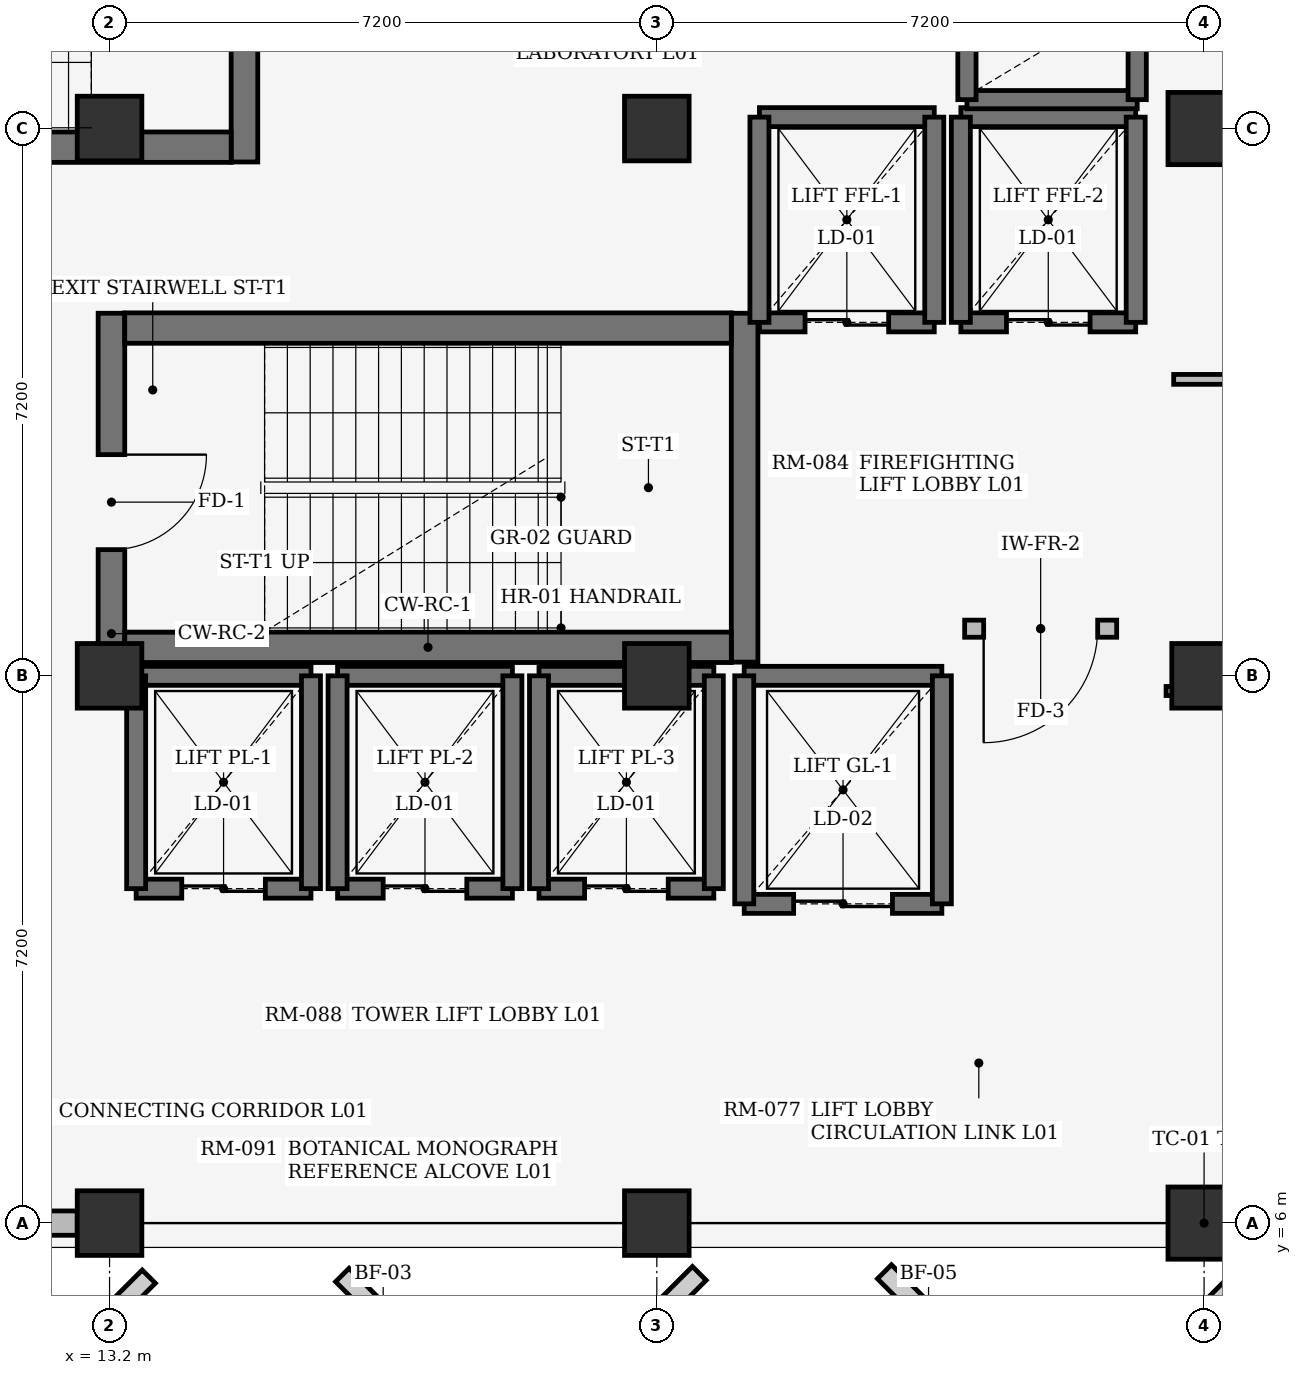
"""IFC4 building model, lengths in metres.
Left out: names, types, materials, properties, quantities, classifications, styles, units other than length and angle.
Written with IfcOpenShell. Run it as: python <this file> out.ifc"""

import sys

from ifc_helpers import new_model, si_unit, direction, frame, frame_2d, origin, origin_2d, place, context, subcontext, project, spatial, rectangle, extrude, element, fill, save


model = new_model("IFC4")
c1 = context("Model", 3, precision=1e-05, world=origin(), true_north=direction((0.0, 1.0)))
c2 = subcontext(c1, "Body", "Model", "MODEL_VIEW")
j1 = project(units=[si_unit("LENGTHUNIT", "METRE"), si_unit("PLANEANGLEUNIT", "RADIAN")], contexts=[c1])
p1 = place(None, origin())
s1 = spatial("IfcSite", under=j1, at=p1, CompositionType="ELEMENT")
p2 = place(p1, origin())
s2 = spatial("IfcBuilding", under=s1, at=p2, CompositionType="ELEMENT")
p3 = place(p2, frame((0.0, 0.0, 4.8)))
s3 = spatial("IfcBuildingStorey", under=s2, at=p3, CompositionType="ELEMENT", Elevation=4.8)
for number, where, z_axis, x_axis in (
    (1, (13.2, 6.0, 0.0), (0.0, 0.0, 1.0), (1.0, 0.0, 0.0)),
    (2, (13.2, 13.2, 0.0), (0.0, 0.0, 1.0), (1.0, 0.0, 0.0)),
    (3, (13.2, 20.4, 0.0), (0.0, 0.0, 1.0), (1.0, 0.0, 0.0)),
    (4, (20.4, 6.0, 0.0), (0.0, 0.0, 1.0), (1.0, 0.0, 0.0)),
    (5, (20.4, 13.2, 0.0), (0.0, 0.0, 1.0), (1.0, 0.0, 0.0)),
    (6, (20.4, 20.4, 0.0), (0.0, 0.0, 1.0), (1.0, 0.0, 0.0)),
):
    element("IfcColumn", number, at=place(p3, frame(where, z_axis=z_axis, x_axis=x_axis)), inside=s3, PredefinedType="COLUMN", context=c2, shape_type="SweptSolid", body=[
        extrude(rectangle(XDim=0.85, YDim=0.85, at=origin_2d()), origin(), (0.0, 0.0, 1.0), 3.95),
    ])
p4 = place(p3, frame((27.6, 6.0, 0.0), z_axis=(0.0, 0.0, 1.0), x_axis=(1.0, 0.0, 0.0)))
e7 = element("IfcColumn", 7, at=p4, inside=s3, PredefinedType="COLUMN", context=c2, shape_type="SweptSolid", body=[
    extrude(rectangle(XDim=0.95, YDim=0.95, at=origin_2d()), origin(), (0.0, 0.0, 1.0), 3.95),
])
p5 = place(p3, frame((27.6, 13.2, 0.0), z_axis=(0.0, 0.0, 1.0), x_axis=(1.0, 0.0, 0.0)))
e8 = element("IfcColumn", 8, at=p5, inside=s3, PredefinedType="COLUMN", context=c2, shape_type="SweptSolid", body=[
    extrude(rectangle(XDim=0.85, YDim=0.85, at=origin_2d()), origin(), (0.0, 0.0, 1.0), 3.95),
])
p6 = place(p3, frame((27.6, 20.4, 0.0), z_axis=(0.0, 0.0, 1.0), x_axis=(1.0, 0.0, 0.0)))
e9 = element("IfcColumn", 9, at=p6, inside=s3, PredefinedType="COLUMN", context=c2, shape_type="SweptSolid", body=[
    extrude(rectangle(XDim=0.95, YDim=0.95, at=origin_2d()), origin(), (0.0, 0.0, 1.0), 3.95),
])
p7 = place(p3, frame((6.425, 6.0, 0.0), z_axis=(0.0, 0.0, 1.0), x_axis=(1.0, 0.0, 0.0)))
e10 = element("IfcWall", 10, at=p7, inside=s3, PredefinedType="STANDARD", context=c2, shape_type="SweptSolid", body=[
    extrude(rectangle(XDim=6.35, YDim=0.32, at=frame_2d((3.175, 0.0))), origin(), (0.0, 0.0, 1.0), 3.33),
])
p8 = place(p7, frame((2.025, 0.0, 0.75)))
e11 = element("IfcOpeningElement", 11, at=p8, cuts=e10, PredefinedType="OPENING", context=c2, shape_type="SweptSolid", body=[
    extrude(rectangle(XDim=2.3, YDim=1.35, at=frame_2d((1.15, 0.675))), frame((0.0, 0.17, 0.0), z_axis=(0.0, -1.0, 0.0), x_axis=(1.0, 0.0, 0.0)), (0.0, 0.0, 1.0), 0.34),
])
p9 = place(p3, frame((13.225, 13.0, 0.0), z_axis=(0.0, 0.0, 1.0), x_axis=(0.0, 1.0, 0.0)))
e12 = element("IfcWall", 12, at=p9, inside=s3, PredefinedType="SHEAR", context=c2, shape_type="SweptSolid", body=[
    extrude(rectangle(XDim=4.97, YDim=0.35, at=frame_2d((2.485, 0.0))), origin(), (0.0, 0.0, 1.0), 3.95),
])
p10 = place(p9, frame((1.86, 0.0, 0.0)))
e13 = element("IfcOpeningElement", 13, at=p10, cuts=e12, PredefinedType="OPENING", context=c2, shape_type="SweptSolid", body=[
    extrude(rectangle(XDim=1.25, YDim=2.2, at=frame_2d((0.625, 1.1))), frame((0.0, 0.185, 0.0), z_axis=(0.0, -1.0, 0.0), x_axis=(1.0, 0.0, 0.0)), (0.0, 0.0, 1.0), 0.37),
])
p11 = place(p3, frame((21.555, 13.38, 0.0), z_axis=(0.0, 0.0, 1.0), x_axis=(0.0, 1.0, 0.0)))
e14 = element("IfcWall", 14, at=p11, inside=s3, PredefinedType="SHEAR", context=c2, shape_type="SweptSolid", body=[
    extrude(rectangle(XDim=4.59, YDim=0.35, at=frame_2d((2.295, 0.0))), origin(), (0.0, 0.0, 1.0), 3.95),
])
for number, where, z_axis, x_axis in (
    (15, (13.4, 13.575, 0.0), (0.0, 0.0, 1.0), (1.0, 0.0, 0.0)),
    (16, (13.4, 17.775, 0.0), (0.0, 0.0, 1.0), (1.0, 0.0, 0.0)),
):
    element("IfcWall", number, at=place(p3, frame(where, z_axis=z_axis, x_axis=x_axis)), inside=s3, PredefinedType="SHEAR", context=c2, shape_type="SweptSolid", body=[
        extrude(rectangle(XDim=7.98, YDim=0.4, at=frame_2d((3.99, 0.0))), origin(), (0.0, 0.0, 1.0), 3.95),
    ])
p12 = place(p3, frame((14.975, 24.55, 0.0), z_axis=(0.0, 0.0, 1.0), x_axis=(0.0, -1.0, 0.0)))
e17 = element("IfcWall", 17, at=p12, inside=s3, PredefinedType="SHEAR", context=c2, shape_type="SweptSolid", body=[
    extrude(rectangle(XDim=4.59, YDim=0.35, at=frame_2d((2.295, 0.0))), origin(), (0.0, 0.0, 1.0), 3.95),
])
p13 = place(p12, frame((1.72, 0.0, 0.0)))
e18 = element("IfcOpeningElement", 18, at=p13, cuts=e17, PredefinedType="OPENING", context=c2, shape_type="SweptSolid", body=[
    extrude(rectangle(XDim=1.15, YDim=2.2, at=frame_2d((0.575, 1.1))), frame((0.0, 0.185, 0.0), z_axis=(0.0, -1.0, 0.0), x_axis=(1.0, 0.0, 0.0)), (0.0, 0.0, 1.0), 0.37),
])
p14 = place(p3, frame((14.8, 20.155, 0.0), z_axis=(0.0, 0.0, 1.0), x_axis=(-1.0, 0.0, 0.0)))
e19 = element("IfcWall", 19, at=p14, inside=s3, PredefinedType="SHEAR", context=c2, shape_type="SweptSolid", body=[
    extrude(rectangle(XDim=7.98, YDim=0.4, at=frame_2d((3.99, 0.0))), origin(), (0.0, 0.0, 1.0), 3.95),
])
p15 = place(p3, frame((21.75, 17.85, 0.0), z_axis=(0.0, 0.0, 1.0), x_axis=(1.0, 0.0, 0.0)))
e20 = element("IfcWall", 20, at=p15, inside=s3, PredefinedType="SHEAR", context=c2, shape_type="SweptSolid", body=[
    extrude(rectangle(XDim=2.3, YDim=0.25, at=frame_2d((1.15, 0.0))), origin(), (0.0, 0.0, 1.0), 3.95),
])
p16 = place(p15, frame((0.6, 0.0, 0.0)))
e21 = element("IfcOpeningElement", 21, at=p16, cuts=e20, PredefinedType="OPENING", context=c2, shape_type="SweptSolid", body=[
    extrude(rectangle(XDim=1.1, YDim=2.2, at=frame_2d((0.55, 1.1))), frame((0.0, 0.135, 0.0), z_axis=(0.0, -1.0, 0.0), x_axis=(1.0, 0.0, 0.0)), (0.0, 0.0, 1.0), 0.27),
])
p17 = place(p3, frame((21.75, 20.55, 0.0), z_axis=(0.0, 0.0, 1.0), x_axis=(1.0, 0.0, 0.0)))
e22 = element("IfcWall", 22, at=p17, inside=s3, PredefinedType="SHEAR", context=c2, shape_type="SweptSolid", body=[
    extrude(rectangle(XDim=2.3, YDim=0.25, at=frame_2d((1.15, 0.0))), origin(), (0.0, 0.0, 1.0), 3.95),
])
for number, where, z_axis, x_axis in (
    (23, (21.75, 17.85, 0.0), (0.0, 0.0, 1.0), (0.0, 1.0, 0.0)),
    (24, (24.05, 17.85, 0.0), (0.0, 0.0, 1.0), (0.0, 1.0, 0.0)),
):
    element("IfcWall", number, at=place(p3, frame(where, z_axis=z_axis, x_axis=x_axis)), inside=s3, PredefinedType="SHEAR", context=c2, shape_type="SweptSolid", body=[
        extrude(rectangle(XDim=2.7, YDim=0.25, at=frame_2d((1.35, 0.0))), origin(), (0.0, 0.0, 1.0), 3.95),
    ])
p18 = place(p3, frame((24.4, 17.85, 0.0), z_axis=(0.0, 0.0, 1.0), x_axis=(1.0, 0.0, 0.0)))
e25 = element("IfcWall", 25, at=p18, inside=s3, PredefinedType="SHEAR", context=c2, shape_type="SweptSolid", body=[
    extrude(rectangle(XDim=2.3, YDim=0.25, at=frame_2d((1.15, 0.0))), origin(), (0.0, 0.0, 1.0), 3.95),
])
p19 = place(p18, frame((0.6, 0.0, 0.0)))
e26 = element("IfcOpeningElement", 26, at=p19, cuts=e25, PredefinedType="OPENING", context=c2, shape_type="SweptSolid", body=[
    extrude(rectangle(XDim=1.1, YDim=2.2, at=frame_2d((0.55, 1.1))), frame((0.0, 0.135, 0.0), z_axis=(0.0, -1.0, 0.0), x_axis=(1.0, 0.0, 0.0)), (0.0, 0.0, 1.0), 0.27),
])
p20 = place(p3, frame((24.4, 20.55, 0.0), z_axis=(0.0, 0.0, 1.0), x_axis=(1.0, 0.0, 0.0)))
e27 = element("IfcWall", 27, at=p20, inside=s3, PredefinedType="SHEAR", context=c2, shape_type="SweptSolid", body=[
    extrude(rectangle(XDim=2.3, YDim=0.25, at=frame_2d((1.15, 0.0))), origin(), (0.0, 0.0, 1.0), 3.95),
])
for number, where, z_axis, x_axis in (
    (28, (24.4, 17.85, 0.0), (0.0, 0.0, 1.0), (0.0, 1.0, 0.0)),
    (29, (26.7, 17.85, 0.0), (0.0, 0.0, 1.0), (0.0, 1.0, 0.0)),
):
    element("IfcWall", number, at=place(p3, frame(where, z_axis=z_axis, x_axis=x_axis)), inside=s3, PredefinedType="SHEAR", context=c2, shape_type="SweptSolid", body=[
        extrude(rectangle(XDim=2.7, YDim=0.25, at=frame_2d((1.35, 0.0))), origin(), (0.0, 0.0, 1.0), 3.95),
    ])
p21 = place(p3, frame((13.55, 10.4, 0.0), z_axis=(0.0, 0.0, 1.0), x_axis=(1.0, 0.0, 0.0)))
e30 = element("IfcWall", 30, at=p21, inside=s3, PredefinedType="SHEAR", context=c2, shape_type="SweptSolid", body=[
    extrude(rectangle(XDim=2.3, YDim=0.25, at=frame_2d((1.15, 0.0))), origin(), (0.0, 0.0, 1.0), 3.95),
])
p22 = place(p21, frame((0.6, 0.0, 0.0)))
e31 = element("IfcOpeningElement", 31, at=p22, cuts=e30, PredefinedType="OPENING", context=c2, shape_type="SweptSolid", body=[
    extrude(rectangle(XDim=1.1, YDim=2.2, at=frame_2d((0.55, 1.1))), frame((0.0, 0.135, 0.0), z_axis=(0.0, -1.0, 0.0), x_axis=(1.0, 0.0, 0.0)), (0.0, 0.0, 1.0), 0.27),
])
p23 = place(p3, frame((13.55, 13.2, 0.0), z_axis=(0.0, 0.0, 1.0), x_axis=(1.0, 0.0, 0.0)))
e32 = element("IfcWall", 32, at=p23, inside=s3, PredefinedType="SHEAR", context=c2, shape_type="SweptSolid", body=[
    extrude(rectangle(XDim=2.3, YDim=0.25, at=frame_2d((1.15, 0.0))), origin(), (0.0, 0.0, 1.0), 3.95),
])
for number, where, z_axis, x_axis in (
    (33, (13.55, 10.4, 0.0), (0.0, 0.0, 1.0), (0.0, 1.0, 0.0)),
    (34, (15.85, 10.4, 0.0), (0.0, 0.0, 1.0), (0.0, 1.0, 0.0)),
):
    element("IfcWall", number, at=place(p3, frame(where, z_axis=z_axis, x_axis=x_axis)), inside=s3, PredefinedType="SHEAR", context=c2, shape_type="SweptSolid", body=[
        extrude(rectangle(XDim=2.8, YDim=0.25, at=frame_2d((1.4, 0.0))), origin(), (0.0, 0.0, 1.0), 3.95),
    ])
p24 = place(p3, frame((16.2, 10.4, 0.0), z_axis=(0.0, 0.0, 1.0), x_axis=(1.0, 0.0, 0.0)))
e35 = element("IfcWall", 35, at=p24, inside=s3, PredefinedType="SHEAR", context=c2, shape_type="SweptSolid", body=[
    extrude(rectangle(XDim=2.3, YDim=0.25, at=frame_2d((1.15, 0.0))), origin(), (0.0, 0.0, 1.0), 3.95),
])
p25 = place(p24, frame((0.6, 0.0, 0.0)))
e36 = element("IfcOpeningElement", 36, at=p25, cuts=e35, PredefinedType="OPENING", context=c2, shape_type="SweptSolid", body=[
    extrude(rectangle(XDim=1.1, YDim=2.2, at=frame_2d((0.55, 1.1))), frame((0.0, 0.135, 0.0), z_axis=(0.0, -1.0, 0.0), x_axis=(1.0, 0.0, 0.0)), (0.0, 0.0, 1.0), 0.27),
])
p26 = place(p3, frame((16.2, 13.2, 0.0), z_axis=(0.0, 0.0, 1.0), x_axis=(1.0, 0.0, 0.0)))
e37 = element("IfcWall", 37, at=p26, inside=s3, PredefinedType="SHEAR", context=c2, shape_type="SweptSolid", body=[
    extrude(rectangle(XDim=2.3, YDim=0.25, at=frame_2d((1.15, 0.0))), origin(), (0.0, 0.0, 1.0), 3.95),
])
for number, where, z_axis, x_axis in (
    (38, (16.2, 10.4, 0.0), (0.0, 0.0, 1.0), (0.0, 1.0, 0.0)),
    (39, (18.5, 10.4, 0.0), (0.0, 0.0, 1.0), (0.0, 1.0, 0.0)),
):
    element("IfcWall", number, at=place(p3, frame(where, z_axis=z_axis, x_axis=x_axis)), inside=s3, PredefinedType="SHEAR", context=c2, shape_type="SweptSolid", body=[
        extrude(rectangle(XDim=2.8, YDim=0.25, at=frame_2d((1.4, 0.0))), origin(), (0.0, 0.0, 1.0), 3.95),
    ])
p27 = place(p3, frame((18.85, 10.4, 0.0), z_axis=(0.0, 0.0, 1.0), x_axis=(1.0, 0.0, 0.0)))
e40 = element("IfcWall", 40, at=p27, inside=s3, PredefinedType="SHEAR", context=c2, shape_type="SweptSolid", body=[
    extrude(rectangle(XDim=2.3, YDim=0.25, at=frame_2d((1.15, 0.0))), origin(), (0.0, 0.0, 1.0), 3.95),
])
p28 = place(p27, frame((0.6, 0.0, 0.0)))
e41 = element("IfcOpeningElement", 41, at=p28, cuts=e40, PredefinedType="OPENING", context=c2, shape_type="SweptSolid", body=[
    extrude(rectangle(XDim=1.1, YDim=2.2, at=frame_2d((0.55, 1.1))), frame((0.0, 0.135, 0.0), z_axis=(0.0, -1.0, 0.0), x_axis=(1.0, 0.0, 0.0)), (0.0, 0.0, 1.0), 0.27),
])
p29 = place(p3, frame((18.85, 13.2, 0.0), z_axis=(0.0, 0.0, 1.0), x_axis=(1.0, 0.0, 0.0)))
e42 = element("IfcWall", 42, at=p29, inside=s3, PredefinedType="SHEAR", context=c2, shape_type="SweptSolid", body=[
    extrude(rectangle(XDim=2.3, YDim=0.25, at=frame_2d((1.15, 0.0))), origin(), (0.0, 0.0, 1.0), 3.95),
])
for number, where, z_axis, x_axis in (
    (43, (18.85, 10.4, 0.0), (0.0, 0.0, 1.0), (0.0, 1.0, 0.0)),
    (44, (21.15, 10.4, 0.0), (0.0, 0.0, 1.0), (0.0, 1.0, 0.0)),
):
    element("IfcWall", number, at=place(p3, frame(where, z_axis=z_axis, x_axis=x_axis)), inside=s3, PredefinedType="SHEAR", context=c2, shape_type="SweptSolid", body=[
        extrude(rectangle(XDim=2.8, YDim=0.25, at=frame_2d((1.4, 0.0))), origin(), (0.0, 0.0, 1.0), 3.95),
    ])
p30 = place(p3, frame((21.55, 10.2, 0.0), z_axis=(0.0, 0.0, 1.0), x_axis=(1.0, 0.0, 0.0)))
e45 = element("IfcWall", 45, at=p30, inside=s3, PredefinedType="SHEAR", context=c2, shape_type="SweptSolid", body=[
    extrude(rectangle(XDim=2.6, YDim=0.25, at=frame_2d((1.3, 0.0))), origin(), (0.0, 0.0, 1.0), 3.95),
])
p31 = place(p30, frame((0.65, 0.0, 0.0)))
e46 = element("IfcOpeningElement", 46, at=p31, cuts=e45, PredefinedType="OPENING", context=c2, shape_type="SweptSolid", body=[
    extrude(rectangle(XDim=1.3, YDim=2.25, at=frame_2d((0.65, 1.125))), frame((0.0, 0.135, 0.0), z_axis=(0.0, -1.0, 0.0), x_axis=(1.0, 0.0, 0.0)), (0.0, 0.0, 1.0), 0.27),
])
p32 = place(p3, frame((21.55, 13.2, 0.0), z_axis=(0.0, 0.0, 1.0), x_axis=(1.0, 0.0, 0.0)))
e47 = element("IfcWall", 47, at=p32, inside=s3, PredefinedType="SHEAR", context=c2, shape_type="SweptSolid", body=[
    extrude(rectangle(XDim=2.6, YDim=0.25, at=frame_2d((1.3, 0.0))), origin(), (0.0, 0.0, 1.0), 3.95),
])
for number, where, z_axis, x_axis in (
    (48, (21.55, 10.2, 0.0), (0.0, 0.0, 1.0), (0.0, 1.0, 0.0)),
    (49, (24.15, 10.2, 0.0), (0.0, 0.0, 1.0), (0.0, 1.0, 0.0)),
):
    element("IfcWall", number, at=place(p3, frame(where, z_axis=z_axis, x_axis=x_axis)), inside=s3, PredefinedType="SHEAR", context=c2, shape_type="SweptSolid", body=[
        extrude(rectangle(XDim=3.0, YDim=0.25, at=frame_2d((1.5, 0.0))), origin(), (0.0, 0.0, 1.0), 3.95),
    ])
p33 = place(p3, frame((24.48, 20.78, 0.0), z_axis=(0.0, 0.0, 1.0), x_axis=(1.0, 0.0, 0.0)))
e50 = element("IfcWall", 50, at=p33, inside=s3, PredefinedType="SHEAR", context=c2, shape_type="SweptSolid", body=[
    extrude(rectangle(XDim=2.24, YDim=0.24, at=frame_2d((1.12, 0.0))), origin(), (0.0, 0.0, 1.0), 3.95),
])
for number, where, z_axis, x_axis in (
    (51, (24.48, 20.78, 0.0), (0.0, 0.0, 1.0), (0.0, 1.0, 0.0)),
    (52, (26.72, 20.78, 0.0), (0.0, 0.0, 1.0), (0.0, 1.0, 0.0)),
):
    element("IfcWall", number, at=place(p3, frame(where, z_axis=z_axis, x_axis=x_axis)), inside=s3, PredefinedType="SHEAR", context=c2, shape_type="SweptSolid", body=[
        extrude(rectangle(XDim=2.94, YDim=0.24, at=frame_2d((1.47, 0.0))), origin(), (0.0, 0.0, 1.0), 3.95),
    ])
p34 = place(p3, frame((24.45, 13.82, 0.0), z_axis=(0.0, 0.0, 1.0), x_axis=(1.0, 0.0, 0.0)))
e53 = element("IfcWall", 53, at=p34, inside=s3, PredefinedType="SOLIDWALL", context=c2, shape_type="SweptSolid", body=[
    extrude(rectangle(XDim=2.0, YDim=0.225, at=frame_2d((1.0, 0.0))), origin(), (0.0, 0.0, 1.0), 3.93),
])
p35 = place(p34, frame((0.25, 0.0, 0.0)))
e54 = element("IfcOpeningElement", 54, at=p35, cuts=e53, PredefinedType="OPENING", context=c2, shape_type="SweptSolid", body=[
    extrude(rectangle(XDim=1.5, YDim=2.2, at=frame_2d((0.75, 1.1))), frame((0.0, 0.123, 0.0), z_axis=(0.0, -1.0, 0.0), x_axis=(1.0, 0.0, 0.0)), (0.0, 0.0, 1.0), 0.245),
])
p36 = place(p3, frame((27.2, 17.1, 0.0), z_axis=(0.0, 0.0, 1.0), x_axis=(1.0, 0.0, 0.0)))
e55 = element("IfcWall", 55, at=p36, inside=s3, PredefinedType="PARTITIONING", context=c2, shape_type="SweptSolid", body=[
    extrude(rectangle(XDim=14.25, YDim=0.13, at=frame_2d((7.125, 0.0))), origin(), (0.0, 0.0, 1.0), 3.93),
])
p37 = place(p36, frame((6.435, 0.0, 0.0)))
e56 = element("IfcOpeningElement", 56, at=p37, cuts=e55, PredefinedType="OPENING", context=c2, shape_type="SweptSolid", body=[
    extrude(rectangle(XDim=1.38, YDim=2.15, at=frame_2d((0.69, 1.075))), frame((0.0, 0.075, 0.0), z_axis=(0.0, -1.0, 0.0), x_axis=(1.0, 0.0, 0.0)), (0.0, 0.0, 1.0), 0.15),
])
p38 = place(p3, frame((27.1, 13.0, 0.0), z_axis=(0.0, 0.0, 1.0), x_axis=(1.0, 0.0, 0.0)))
e57 = element("IfcWall", 57, at=p38, inside=s3, PredefinedType="PARTITIONING", context=c2, shape_type="SweptSolid", body=[
    extrude(rectangle(XDim=14.35, YDim=0.12, at=frame_2d((7.175, 0.0))), origin(), (0.0, 0.0, 1.0), 3.93),
])
p39 = place(p38, frame((4.729, 0.0, 0.0)))
e58 = element("IfcOpeningElement", 58, at=p39, cuts=e57, PredefinedType="OPENING", context=c2, shape_type="SweptSolid", body=[
    extrude(rectangle(XDim=1.48, YDim=2.2, at=frame_2d((0.74, 1.1))), frame((0.0, 0.07, 0.0), z_axis=(0.0, -1.0, 0.0), x_axis=(1.0, 0.0, 0.0)), (0.0, 0.0, 1.0), 0.14),
])
p40 = place(p10, origin())
e59 = element("IfcDoor", 59, at=p40, inside=s3, OperationType="SINGLE_SWING_RIGHT", PredefinedType="DOOR", context=c2, shape_type="SweptSolid", body=[
    extrude(rectangle(XDim=1.25, YDim=2.2, at=frame_2d((0.625, 1.1))), frame((0.0, 0.025, 0.0), z_axis=(0.0, -1.0, 0.0), x_axis=(1.0, 0.0, 0.0)), (0.0, 0.0, 1.0), 0.05),
])
fill(e13, e59)
p41 = place(p16, origin())
e60 = element("IfcDoor", 60, at=p41, inside=s3, OperationType="DOUBLE_DOOR_SLIDING", PredefinedType="DOOR", context=c2, shape_type="SweptSolid", body=[
    extrude(rectangle(XDim=1.1, YDim=2.2, at=frame_2d((0.55, 1.1))), frame((0.0, 0.025, 0.0), z_axis=(0.0, -1.0, 0.0), x_axis=(1.0, 0.0, 0.0)), (0.0, 0.0, 1.0), 0.05),
])
fill(e21, e60)
p42 = place(p19, origin())
e61 = element("IfcDoor", 61, at=p42, inside=s3, OperationType="DOUBLE_DOOR_SLIDING", PredefinedType="DOOR", context=c2, shape_type="SweptSolid", body=[
    extrude(rectangle(XDim=1.1, YDim=2.2, at=frame_2d((0.55, 1.1))), frame((0.0, 0.025, 0.0), z_axis=(0.0, -1.0, 0.0), x_axis=(1.0, 0.0, 0.0)), (0.0, 0.0, 1.0), 0.05),
])
fill(e26, e61)
p43 = place(p22, origin())
e62 = element("IfcDoor", 62, at=p43, inside=s3, OperationType="DOUBLE_DOOR_SLIDING", PredefinedType="DOOR", context=c2, shape_type="SweptSolid", body=[
    extrude(rectangle(XDim=1.1, YDim=2.2, at=frame_2d((0.55, 1.1))), frame((0.0, 0.025, 0.0), z_axis=(0.0, -1.0, 0.0), x_axis=(1.0, 0.0, 0.0)), (0.0, 0.0, 1.0), 0.05),
])
fill(e31, e62)
p44 = place(p25, origin())
e63 = element("IfcDoor", 63, at=p44, inside=s3, OperationType="DOUBLE_DOOR_SLIDING", PredefinedType="DOOR", context=c2, shape_type="SweptSolid", body=[
    extrude(rectangle(XDim=1.1, YDim=2.2, at=frame_2d((0.55, 1.1))), frame((0.0, 0.025, 0.0), z_axis=(0.0, -1.0, 0.0), x_axis=(1.0, 0.0, 0.0)), (0.0, 0.0, 1.0), 0.05),
])
fill(e36, e63)
p45 = place(p28, origin())
e64 = element("IfcDoor", 64, at=p45, inside=s3, OperationType="DOUBLE_DOOR_SLIDING", PredefinedType="DOOR", context=c2, shape_type="SweptSolid", body=[
    extrude(rectangle(XDim=1.1, YDim=2.2, at=frame_2d((0.55, 1.1))), frame((0.0, 0.025, 0.0), z_axis=(0.0, -1.0, 0.0), x_axis=(1.0, 0.0, 0.0)), (0.0, 0.0, 1.0), 0.05),
])
fill(e41, e64)
p46 = place(p31, origin())
e65 = element("IfcDoor", 65, at=p46, inside=s3, OperationType="DOUBLE_DOOR_SLIDING", PredefinedType="DOOR", context=c2, shape_type="SweptSolid", body=[
    extrude(rectangle(XDim=1.3, YDim=2.25, at=frame_2d((0.65, 1.125))), frame((0.0, 0.025, 0.0), z_axis=(0.0, -1.0, 0.0), x_axis=(1.0, 0.0, 0.0)), (0.0, 0.0, 1.0), 0.05),
])
fill(e46, e65)
p47 = place(p35, frame((1.5, 0.0, 0.0), z_axis=(0.0, 0.0, 1.0), x_axis=(-1.0, 0.0, 0.0)))
e66 = element("IfcDoor", 66, at=p47, inside=s3, OperationType="SINGLE_SWING_LEFT", PredefinedType="DOOR", context=c2, shape_type="SweptSolid", body=[
    extrude(rectangle(XDim=1.5, YDim=2.2, at=frame_2d((0.75, 1.1))), frame((0.0, 0.025, 0.0), z_axis=(0.0, -1.0, 0.0), x_axis=(1.0, 0.0, 0.0)), (0.0, 0.0, 1.0), 0.05),
])
fill(e54, e66)
save(model, sys.argv[1])
